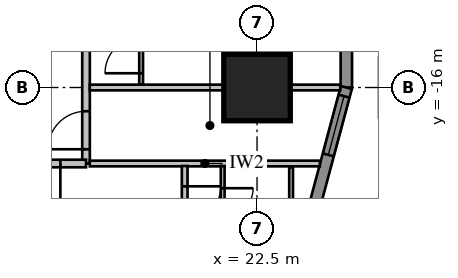
"""IFC4 building model, lengths in metres.
Left out: names, types, materials, properties, quantities, classifications, styles, units other than length and angle.
Written with IfcOpenShell. Run it as: python <this file> out.ifc"""

import sys

from ifc_helpers import new_model, si_unit, direction, frame, frame_2d, origin, origin_2d, place, context, subcontext, project, spatial, rectangle, extrude, element, fill, save


model = new_model("IFC4")
c1 = context("Model", 3, precision=1e-05, world=origin(), true_north=direction((0.0, 1.0)))
c2 = subcontext(c1, "Body", "Model", "MODEL_VIEW")
j1 = project(units=[si_unit("LENGTHUNIT", "METRE"), si_unit("PLANEANGLEUNIT", "RADIAN")], contexts=[c1])
p1 = place(None, origin())
s1 = spatial("IfcSite", under=j1, at=p1, CompositionType="ELEMENT")
p2 = place(p1, origin())
s2 = spatial("IfcBuilding", under=s1, at=p2, CompositionType="ELEMENT")
p3 = place(p2, frame((0.0, 0.0, 39.1)))
s3 = spatial("IfcBuildingStorey", under=s2, at=p3, CompositionType="ELEMENT", Elevation=39.1)
p4 = place(p3, frame((22.5, -16.0, 0.0), z_axis=(0.0, 0.0, 1.0), x_axis=(1.0, 0.0, 0.0)))
e1 = element("IfcColumn", 1, at=p4, inside=s3, PredefinedType="COLUMN", context=c2, shape_type="SweptSolid", body=[
    extrude(rectangle(XDim=1.75, YDim=1.75, at=origin_2d()), origin(), (0.0, 0.0, 1.0), 3.85),
])
p5 = place(p3, frame((24.85, -16.0, 0.0), z_axis=(0.0, 0.0, 1.0), x_axis=(0.0, 1.0, 0.0)))
e2 = element("IfcWall", 2, at=p5, inside=s3, PredefinedType="SOLIDWALL", context=c2, shape_type="SweptSolid", body=[
    extrude(rectangle(XDim=32.0, YDim=0.3, at=frame_2d((16.0, 0.0))), origin(), (0.0, 0.0, 1.0), 3.65),
])
p6 = place(p5, frame((1.2, 0.0, 0.75)))
e3 = element("IfcOpeningElement", 3, at=p6, cuts=e2, PredefinedType="OPENING", context=c2, shape_type="SweptSolid", body=[
    extrude(rectangle(XDim=1.6, YDim=1.8, at=frame_2d((0.8, 0.9))), frame((0.0, 0.17, 0.0), z_axis=(0.0, -1.0, 0.0), x_axis=(1.0, 0.0, 0.0)), (0.0, 0.0, 1.0), 0.34),
])
p7 = place(p5, frame((5.2, 0.0, 0.75)))
e4 = element("IfcOpeningElement", 4, at=p7, cuts=e2, PredefinedType="OPENING", context=c2, shape_type="SweptSolid", body=[
    extrude(rectangle(XDim=1.6, YDim=1.8, at=frame_2d((0.8, 0.9))), frame((0.0, 0.17, 0.0), z_axis=(0.0, -1.0, 0.0), x_axis=(1.0, 0.0, 0.0)), (0.0, 0.0, 1.0), 0.34),
])
p8 = place(p5, frame((17.2, 0.0, 0.75)))
e5 = element("IfcOpeningElement", 5, at=p8, cuts=e2, PredefinedType="OPENING", context=c2, shape_type="SweptSolid", body=[
    extrude(rectangle(XDim=1.6, YDim=1.8, at=frame_2d((0.8, 0.9))), frame((0.0, 0.17, 0.0), z_axis=(0.0, -1.0, 0.0), x_axis=(1.0, 0.0, 0.0)), (0.0, 0.0, 1.0), 0.34),
])
p9 = place(p5, frame((21.2, 0.0, 0.75)))
e6 = element("IfcOpeningElement", 6, at=p9, cuts=e2, PredefinedType="OPENING", context=c2, shape_type="SweptSolid", body=[
    extrude(rectangle(XDim=1.6, YDim=1.8, at=frame_2d((0.8, 0.9))), frame((0.0, 0.17, 0.0), z_axis=(0.0, -1.0, 0.0), x_axis=(1.0, 0.0, 0.0)), (0.0, 0.0, 1.0), 0.34),
])
p10 = place(p5, frame((25.2, 0.0, 0.75)))
e7 = element("IfcOpeningElement", 7, at=p10, cuts=e2, PredefinedType="OPENING", context=c2, shape_type="SweptSolid", body=[
    extrude(rectangle(XDim=1.6, YDim=1.8, at=frame_2d((0.8, 0.9))), frame((0.0, 0.17, 0.0), z_axis=(0.0, -1.0, 0.0), x_axis=(1.0, 0.0, 0.0)), (0.0, 0.0, 1.0), 0.34),
])
p11 = place(p5, frame((29.2, 0.0, 0.75)))
e8 = element("IfcOpeningElement", 8, at=p11, cuts=e2, PredefinedType="OPENING", context=c2, shape_type="SweptSolid", body=[
    extrude(rectangle(XDim=1.6, YDim=1.8, at=frame_2d((0.8, 0.9))), frame((0.0, 0.17, 0.0), z_axis=(0.0, -1.0, 0.0), x_axis=(1.0, 0.0, 0.0)), (0.0, 0.0, 1.0), 0.34),
])
p12 = place(p5, frame((8.8, 0.0, 0.75)))
e9 = element("IfcOpeningElement", 9, at=p12, cuts=e2, PredefinedType="OPENING", context=c2, shape_type="SweptSolid", body=[
    extrude(rectangle(XDim=2.4, YDim=1.8, at=frame_2d((1.2, 0.9))), frame((0.0, 0.17, 0.0), z_axis=(0.0, -1.0, 0.0), x_axis=(1.0, 0.0, 0.0)), (0.0, 0.0, 1.0), 0.34),
])
p13 = place(p5, frame((13.812, 0.0, 0.0)))
e10 = element("IfcOpeningElement", 10, at=p13, cuts=e2, PredefinedType="OPENING", context=c2, shape_type="SweptSolid", body=[
    extrude(rectangle(XDim=1.0, YDim=2.4, at=frame_2d((0.5, 1.2))), frame((0.0, 0.17, 0.0), z_axis=(0.0, -1.0, 0.0), x_axis=(1.0, 0.0, 0.0)), (0.0, 0.0, 1.0), 0.34),
])
p14 = place(p3, frame((23.664, -20.425, 0.0), z_axis=(0.0, 0.0, 1.0), x_axis=(0.258839972501, 0.965920218567, 0.0)))
e11 = element("IfcWall", 11, at=p14, inside=s3, PredefinedType="SOLIDWALL", context=c2, shape_type="SweptSolid", body=[
    extrude(rectangle(XDim=4.581, YDim=0.3, at=frame_2d((2.291, 0.0))), origin(), (0.0, 0.0, 1.0), 3.65),
])
p15 = place(p14, frame((2.746, 0.0, 0.75)))
e12 = element("IfcOpeningElement", 12, at=p15, cuts=e11, PredefinedType="OPENING", context=c2, shape_type="SweptSolid", body=[
    extrude(rectangle(XDim=1.6, YDim=1.8, at=frame_2d((0.8, 0.9))), frame((0.0, 0.17, 0.0), z_axis=(0.0, -1.0, 0.0), x_axis=(1.0, 0.0, 0.0)), (0.0, 0.0, 1.0), 0.34),
])
p16 = place(p3, frame((18.0, -18.0, 0.0), z_axis=(0.0, 0.0, 1.0), x_axis=(0.0, 1.0, 0.0)))
e13 = element("IfcWall", 13, at=p16, inside=s3, PredefinedType="PARTITIONING", context=c2, shape_type="SweptSolid", body=[
    extrude(rectangle(XDim=36.0, YDim=0.2, at=frame_2d((18.0, 0.0))), origin(), (0.0, 0.0, 1.0), 3.65),
])
p17 = place(p16, frame((10.4, 0.0, 0.0)))
e14 = element("IfcOpeningElement", 14, at=p17, cuts=e13, PredefinedType="OPENING", context=c2, shape_type="SweptSolid", body=[
    extrude(rectangle(XDim=1.0, YDim=2.1, at=frame_2d((0.5, 1.05))), frame((0.0, 0.12, 0.0), z_axis=(0.0, -1.0, 0.0), x_axis=(1.0, 0.0, 0.0)), (0.0, 0.0, 1.0), 0.24),
])
p18 = place(p16, frame((0.375, 0.0, 0.0)))
e15 = element("IfcOpeningElement", 15, at=p18, cuts=e13, PredefinedType="OPENING", context=c2, shape_type="SweptSolid", body=[
    extrude(rectangle(XDim=1.0, YDim=2.1, at=frame_2d((0.5, 1.05))), frame((0.0, 0.12, 0.0), z_axis=(0.0, -1.0, 0.0), x_axis=(1.0, 0.0, 0.0)), (0.0, 0.0, 1.0), 0.24),
])
p19 = place(p16, frame((34.375, 0.0, 0.0)))
e16 = element("IfcOpeningElement", 16, at=p19, cuts=e13, PredefinedType="OPENING", context=c2, shape_type="SweptSolid", body=[
    extrude(rectangle(XDim=0.95, YDim=2.1, at=frame_2d((0.475, 1.05))), frame((0.0, 0.12, 0.0), z_axis=(0.0, -1.0, 0.0), x_axis=(1.0, 0.0, 0.0)), (0.0, 0.0, 1.0), 0.24),
])
p20 = place(p3, frame((19.45, -15.925, 0.0), z_axis=(0.0, 0.0, 1.0), x_axis=(0.0, 1.0, 0.0)))
e17 = element("IfcWall", 17, at=p20, inside=s3, PredefinedType="PARTITIONING", context=c2, shape_type="SweptSolid", body=[
    extrude(rectangle(XDim=31.85, YDim=0.1, at=frame_2d((15.925, 0.0))), origin(), (0.0, 0.0, 1.0), 3.65),
])
p21 = place(p20, frame((10.125, 0.0, 0.0)))
e18 = element("IfcOpeningElement", 18, at=p21, cuts=e17, PredefinedType="OPENING", context=c2, shape_type="SweptSolid", body=[
    extrude(rectangle(XDim=1.0, YDim=2.1, at=frame_2d((0.5, 1.05))), frame((0.0, 0.07, 0.0), z_axis=(0.0, -1.0, 0.0), x_axis=(1.0, 0.0, 0.0)), (0.0, 0.0, 1.0), 0.14),
])
p22 = place(p20, frame((8.3, 0.0, 0.0)))
e19 = element("IfcOpeningElement", 19, at=p22, cuts=e17, PredefinedType="OPENING", context=c2, shape_type="SweptSolid", body=[
    extrude(rectangle(XDim=0.8, YDim=2.1, at=frame_2d((0.4, 1.05))), frame((0.0, 0.07, 0.0), z_axis=(0.0, -1.0, 0.0), x_axis=(1.0, 0.0, 0.0)), (0.0, 0.0, 1.0), 0.14),
])
p23 = place(p20, frame((0.3, 0.0, 0.0)))
e20 = element("IfcOpeningElement", 20, at=p23, cuts=e17, PredefinedType="OPENING", context=c2, shape_type="SweptSolid", body=[
    extrude(rectangle(XDim=0.95, YDim=2.1, at=frame_2d((0.475, 1.05))), frame((0.0, 0.07, 0.0), z_axis=(0.0, -1.0, 0.0), x_axis=(1.0, 0.0, 0.0)), (0.0, 0.0, 1.0), 0.14),
])
p24 = place(p20, frame((6.175, 0.0, 0.0)))
e21 = element("IfcOpeningElement", 21, at=p24, cuts=e17, PredefinedType="OPENING", context=c2, shape_type="SweptSolid", body=[
    extrude(rectangle(XDim=0.95, YDim=2.1, at=frame_2d((0.475, 1.05))), frame((0.0, 0.07, 0.0), z_axis=(0.0, -1.0, 0.0), x_axis=(1.0, 0.0, 0.0)), (0.0, 0.0, 1.0), 0.14),
])
p25 = place(p20, frame((16.3, 0.0, 0.0)))
e22 = element("IfcOpeningElement", 22, at=p25, cuts=e17, PredefinedType="OPENING", context=c2, shape_type="SweptSolid", body=[
    extrude(rectangle(XDim=0.95, YDim=2.1, at=frame_2d((0.475, 1.05))), frame((0.0, 0.07, 0.0), z_axis=(0.0, -1.0, 0.0), x_axis=(1.0, 0.0, 0.0)), (0.0, 0.0, 1.0), 0.14),
])
p26 = place(p20, frame((22.175, 0.0, 0.0)))
e23 = element("IfcOpeningElement", 23, at=p26, cuts=e17, PredefinedType="OPENING", context=c2, shape_type="SweptSolid", body=[
    extrude(rectangle(XDim=0.95, YDim=2.1, at=frame_2d((0.475, 1.05))), frame((0.0, 0.07, 0.0), z_axis=(0.0, -1.0, 0.0), x_axis=(1.0, 0.0, 0.0)), (0.0, 0.0, 1.0), 0.14),
])
p27 = place(p20, frame((24.3, 0.0, 0.0)))
e24 = element("IfcOpeningElement", 24, at=p27, cuts=e17, PredefinedType="OPENING", context=c2, shape_type="SweptSolid", body=[
    extrude(rectangle(XDim=0.95, YDim=2.1, at=frame_2d((0.475, 1.05))), frame((0.0, 0.07, 0.0), z_axis=(0.0, -1.0, 0.0), x_axis=(1.0, 0.0, 0.0)), (0.0, 0.0, 1.0), 0.14),
])
p28 = place(p20, frame((30.175, 0.0, 0.0)))
e25 = element("IfcOpeningElement", 25, at=p28, cuts=e17, PredefinedType="OPENING", context=c2, shape_type="SweptSolid", body=[
    extrude(rectangle(XDim=0.95, YDim=2.1, at=frame_2d((0.475, 1.05))), frame((0.0, 0.07, 0.0), z_axis=(0.0, -1.0, 0.0), x_axis=(1.0, 0.0, 0.0)), (0.0, 0.0, 1.0), 0.14),
])
p29 = place(p3, frame((18.1, -18.0, 0.0), z_axis=(0.0, 0.0, 1.0), x_axis=(1.0, 0.0, 0.0)))
e26 = element("IfcWall", 26, at=p29, inside=s3, PredefinedType="PARTITIONING", context=c2, shape_type="SweptSolid", body=[
    extrude(rectangle(XDim=6.053, YDim=0.15, at=frame_2d((3.027, 0.0))), origin(), (0.0, 0.0, 1.0), 3.65),
])
p30 = place(p3, frame((18.1, -16.0, 0.0), z_axis=(0.0, 0.0, 1.0), x_axis=(1.0, 0.0, 0.0)))
e27 = element("IfcWall", 27, at=p30, inside=s3, PredefinedType="PARTITIONING", context=c2, shape_type="SweptSolid", body=[
    extrude(rectangle(XDim=6.589, YDim=0.15, at=frame_2d((3.295, 0.0))), origin(), (0.0, 0.0, 1.0), 3.65),
])
p31 = place(p3, frame((-18.0, -18.0, 0.0), z_axis=(0.0, 0.0, 1.0), x_axis=(1.0, 0.0, 0.0)))
e28 = element("IfcWall", 28, at=p31, inside=s3, PredefinedType="PARTITIONING", context=c2, shape_type="SweptSolid", body=[
    extrude(rectangle(XDim=36.0, YDim=0.2, at=frame_2d((18.0, 0.0))), origin(), (0.0, 0.0, 1.0), 3.65),
])
p32 = place(p31, frame((0.375, 0.0, 0.0)))
e29 = element("IfcOpeningElement", 29, at=p32, cuts=e28, PredefinedType="OPENING", context=c2, shape_type="SweptSolid", body=[
    extrude(rectangle(XDim=1.0, YDim=2.1, at=frame_2d((0.5, 1.05))), frame((0.0, 0.12, 0.0), z_axis=(0.0, -1.0, 0.0), x_axis=(1.0, 0.0, 0.0)), (0.0, 0.0, 1.0), 0.24),
])
p33 = place(p31, frame((2.45, 0.0, 0.0)))
e30 = element("IfcOpeningElement", 30, at=p33, cuts=e28, PredefinedType="OPENING", context=c2, shape_type="SweptSolid", body=[
    extrude(rectangle(XDim=0.8, YDim=2.1, at=frame_2d((0.4, 1.05))), frame((0.0, 0.12, 0.0), z_axis=(0.0, -1.0, 0.0), x_axis=(1.0, 0.0, 0.0)), (0.0, 0.0, 1.0), 0.24),
])
p34 = place(p31, frame((4.05, 0.0, 0.0)))
e31 = element("IfcOpeningElement", 31, at=p34, cuts=e28, PredefinedType="OPENING", context=c2, shape_type="SweptSolid", body=[
    extrude(rectangle(XDim=1.0, YDim=2.1, at=frame_2d((0.5, 1.05))), frame((0.0, 0.12, 0.0), z_axis=(0.0, -1.0, 0.0), x_axis=(1.0, 0.0, 0.0)), (0.0, 0.0, 1.0), 0.24),
])
p35 = place(p31, frame((6.45, 0.0, 0.0)))
e32 = element("IfcOpeningElement", 32, at=p35, cuts=e28, PredefinedType="OPENING", context=c2, shape_type="SweptSolid", body=[
    extrude(rectangle(XDim=0.9, YDim=2.1, at=frame_2d((0.45, 1.05))), frame((0.0, 0.12, 0.0), z_axis=(0.0, -1.0, 0.0), x_axis=(1.0, 0.0, 0.0)), (0.0, 0.0, 1.0), 0.24),
])
p36 = place(p31, frame((8.15, 0.0, 0.0)))
e33 = element("IfcOpeningElement", 33, at=p36, cuts=e28, PredefinedType="OPENING", context=c2, shape_type="SweptSolid", body=[
    extrude(rectangle(XDim=1.0, YDim=2.1, at=frame_2d((0.5, 1.05))), frame((0.0, 0.12, 0.0), z_axis=(0.0, -1.0, 0.0), x_axis=(1.0, 0.0, 0.0)), (0.0, 0.0, 1.0), 0.24),
])
p37 = place(p31, frame((18.375, 0.0, 0.0)))
e34 = element("IfcOpeningElement", 34, at=p37, cuts=e28, PredefinedType="OPENING", context=c2, shape_type="SweptSolid", body=[
    extrude(rectangle(XDim=0.95, YDim=2.1, at=frame_2d((0.475, 1.05))), frame((0.0, 0.12, 0.0), z_axis=(0.0, -1.0, 0.0), x_axis=(1.0, 0.0, 0.0)), (0.0, 0.0, 1.0), 0.24),
])
p38 = place(p31, frame((24.25, 0.0, 0.0)))
e35 = element("IfcOpeningElement", 35, at=p38, cuts=e28, PredefinedType="OPENING", context=c2, shape_type="SweptSolid", body=[
    extrude(rectangle(XDim=0.95, YDim=2.1, at=frame_2d((0.475, 1.05))), frame((0.0, 0.12, 0.0), z_axis=(0.0, -1.0, 0.0), x_axis=(1.0, 0.0, 0.0)), (0.0, 0.0, 1.0), 0.24),
])
p39 = place(p31, frame((26.375, 0.0, 0.0)))
e36 = element("IfcOpeningElement", 36, at=p39, cuts=e28, PredefinedType="OPENING", context=c2, shape_type="SweptSolid", body=[
    extrude(rectangle(XDim=0.95, YDim=2.1, at=frame_2d((0.475, 1.05))), frame((0.0, 0.12, 0.0), z_axis=(0.0, -1.0, 0.0), x_axis=(1.0, 0.0, 0.0)), (0.0, 0.0, 1.0), 0.24),
])
p40 = place(p31, frame((32.25, 0.0, 0.0)))
e37 = element("IfcOpeningElement", 37, at=p40, cuts=e28, PredefinedType="OPENING", context=c2, shape_type="SweptSolid", body=[
    extrude(rectangle(XDim=0.95, YDim=2.1, at=frame_2d((0.475, 1.05))), frame((0.0, 0.12, 0.0), z_axis=(0.0, -1.0, 0.0), x_axis=(1.0, 0.0, 0.0)), (0.0, 0.0, 1.0), 0.24),
])
p41 = place(p31, frame((34.375, 0.0, 0.0)))
e38 = element("IfcOpeningElement", 38, at=p41, cuts=e28, PredefinedType="OPENING", context=c2, shape_type="SweptSolid", body=[
    extrude(rectangle(XDim=0.95, YDim=2.1, at=frame_2d((0.475, 1.05))), frame((0.0, 0.12, 0.0), z_axis=(0.0, -1.0, 0.0), x_axis=(1.0, 0.0, 0.0)), (0.0, 0.0, 1.0), 0.24),
])
p42 = place(p31, frame((11.2, 0.0, 0.0)))
e39 = element("IfcOpeningElement", 39, at=p42, cuts=e28, PredefinedType="OPENING", context=c2, shape_type="SweptSolid", body=[
    extrude(rectangle(XDim=1.0, YDim=2.1, at=frame_2d((0.5, 1.05))), frame((0.0, 0.12, 0.0), z_axis=(0.0, -1.0, 0.0), x_axis=(1.0, 0.0, 0.0)), (0.0, 0.0, 1.0), 0.24),
])
p43 = place(p3, frame((21.596, -18.065, 0.0), z_axis=(0.0, 0.0, 1.0), x_axis=(0.0, -1.0, 0.0)))
e40 = element("IfcWall", 40, at=p43, inside=s3, PredefinedType="PARTITIONING", context=c2, shape_type="SweptSolid", body=[
    extrude(rectangle(XDim=2.335, YDim=0.1, at=frame_2d((1.167, 0.0))), origin(), (0.0, 0.0, 1.0), 3.65),
])
p44 = place(p43, frame((0.585, 0.0, 0.0)))
e41 = element("IfcOpeningElement", 41, at=p44, cuts=e40, PredefinedType="OPENING", context=c2, shape_type="SweptSolid", body=[
    extrude(rectangle(XDim=0.8, YDim=2.1, at=frame_2d((0.4, 1.05))), frame((0.0, 0.07, 0.0), z_axis=(0.0, -1.0, 0.0), x_axis=(1.0, 0.0, 0.0)), (0.0, 0.0, 1.0), 0.14),
])
p45 = place(p3, frame((23.396, -18.1, 0.0), z_axis=(0.0, 0.0, 1.0), x_axis=(0.0, -1.0, 0.0)))
e42 = element("IfcWall", 42, at=p45, inside=s3, PredefinedType="PARTITIONING", context=c2, shape_type="SweptSolid", body=[
    extrude(rectangle(XDim=2.3, YDim=0.1, at=frame_2d((1.15, 0.0))), origin(), (0.0, 0.0, 1.0), 3.65),
])
p46 = place(p3, frame((20.596, -18.065, 0.0), z_axis=(0.0, 0.0, 1.0), x_axis=(0.0, -1.0, 0.0)))
e43 = element("IfcWall", 43, at=p46, inside=s3, PredefinedType="PARTITIONING", context=c2, shape_type="SweptSolid", body=[
    extrude(rectangle(XDim=5.209, YDim=0.15, at=frame_2d((2.604, 0.0))), origin(), (0.0, 0.0, 1.0), 3.65),
])
p47 = place(p46, frame((0.535, 0.0, 0.0)))
e44 = element("IfcOpeningElement", 44, at=p47, cuts=e43, PredefinedType="OPENING", context=c2, shape_type="SweptSolid", body=[
    extrude(rectangle(XDim=0.95, YDim=2.1, at=frame_2d((0.475, 1.05))), frame((0.0, 0.095, 0.0), z_axis=(0.0, -1.0, 0.0), x_axis=(1.0, 0.0, 0.0)), (0.0, 0.0, 1.0), 0.19),
])
p48 = place(p15, origin())
e45 = element("IfcWindow", 45, at=p48, inside=s3, PartitioningType="SINGLE_PANEL", PredefinedType="WINDOW", context=c2, shape_type="SweptSolid", body=[
    extrude(rectangle(XDim=1.6, YDim=1.8, at=frame_2d((0.8, 0.9))), frame((0.0, 0.03, 0.0), z_axis=(0.0, -1.0, 0.0), x_axis=(1.0, 0.0, 0.0)), (0.0, 0.0, 1.0), 0.06),
])
fill(e12, e45)
p49 = place(p18, origin())
e46 = element("IfcDoor", 46, at=p49, inside=s3, OperationType="SINGLE_SWING_LEFT", PredefinedType="DOOR", context=c2, shape_type="SweptSolid", body=[
    extrude(rectangle(XDim=1.0, YDim=2.1, at=frame_2d((0.5, 1.05))), frame((0.0, 0.025, 0.0), z_axis=(0.0, -1.0, 0.0), x_axis=(1.0, 0.0, 0.0)), (0.0, 0.0, 1.0), 0.05),
])
fill(e15, e46)
p50 = place(p23, origin())
e47 = element("IfcDoor", 47, at=p50, inside=s3, OperationType="SINGLE_SWING_LEFT", PredefinedType="DOOR", context=c2, shape_type="SweptSolid", body=[
    extrude(rectangle(XDim=0.95, YDim=2.1, at=frame_2d((0.475, 1.05))), frame((0.0, 0.025, 0.0), z_axis=(0.0, -1.0, 0.0), x_axis=(1.0, 0.0, 0.0)), (0.0, 0.0, 1.0), 0.05),
])
fill(e20, e47)
p51 = place(p41, origin())
e48 = element("IfcDoor", 48, at=p51, inside=s3, OperationType="SINGLE_SWING_RIGHT", PredefinedType="DOOR", context=c2, shape_type="SweptSolid", body=[
    extrude(rectangle(XDim=0.95, YDim=2.1, at=frame_2d((0.475, 1.05))), frame((0.0, 0.025, 0.0), z_axis=(0.0, -1.0, 0.0), x_axis=(1.0, 0.0, 0.0)), (0.0, 0.0, 1.0), 0.05),
])
fill(e38, e48)
p52 = place(p44, origin())
e49 = element("IfcDoor", 49, at=p52, inside=s3, OperationType="SINGLE_SWING_LEFT", PredefinedType="DOOR", context=c2, shape_type="SweptSolid", body=[
    extrude(rectangle(XDim=0.8, YDim=2.1, at=frame_2d((0.4, 1.05))), frame((0.0, 0.025, 0.0), z_axis=(0.0, -1.0, 0.0), x_axis=(1.0, 0.0, 0.0)), (0.0, 0.0, 1.0), 0.05),
])
fill(e41, e49)
p53 = place(p47, origin())
e50 = element("IfcDoor", 50, at=p53, inside=s3, OperationType="SINGLE_SWING_LEFT", PredefinedType="DOOR", context=c2, shape_type="SweptSolid", body=[
    extrude(rectangle(XDim=0.95, YDim=2.1, at=frame_2d((0.475, 1.05))), frame((0.0, 0.025, 0.0), z_axis=(0.0, -1.0, 0.0), x_axis=(1.0, 0.0, 0.0)), (0.0, 0.0, 1.0), 0.05),
])
fill(e44, e50)
save(model, sys.argv[1])
